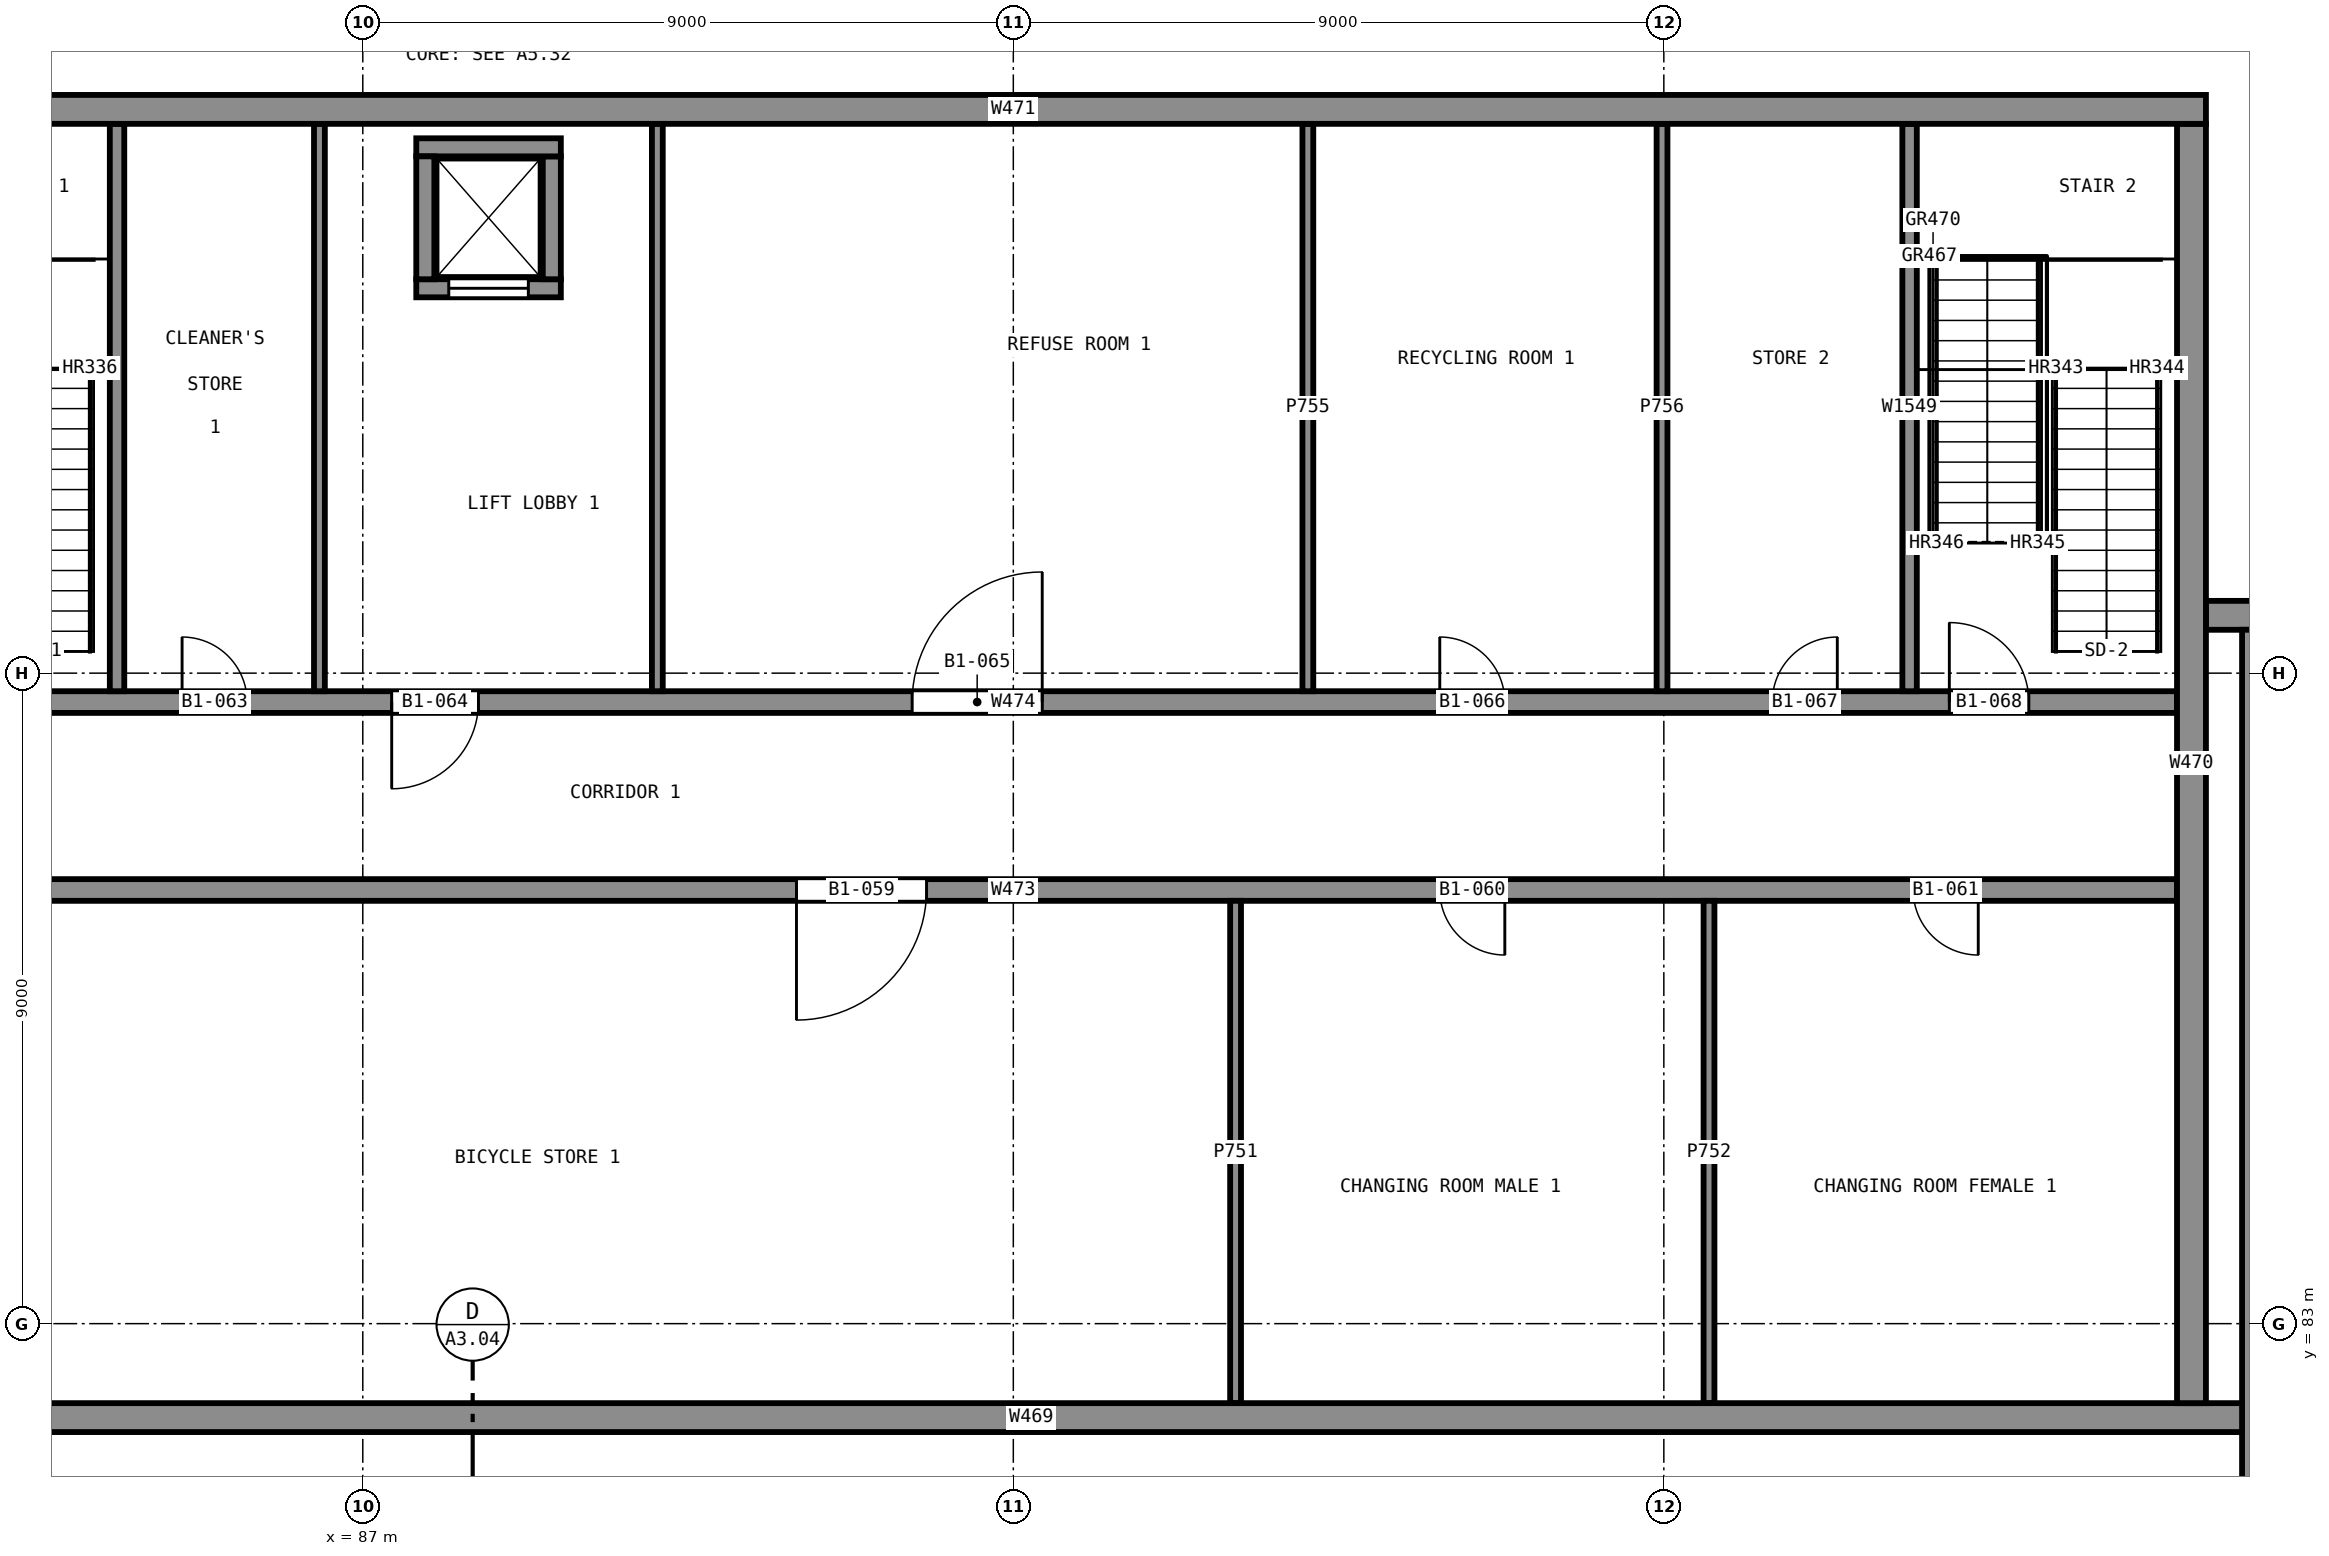
"""IFC4 building model, lengths in metres.
Left out: names, types, materials, properties, quantities, classifications, styles, units other than length and angle.
Written with IfcOpenShell. Run it as: python <this file> out.ifc"""

import sys

from ifc_helpers import new_model, si_unit, direction, frame, frame_2d, origin, place, context, subcontext, project, spatial, rectangle, extrude, element, fill, save


model = new_model("IFC4")
c1 = context("Model", 3, precision=1e-05, world=origin(), true_north=direction((0.0, 1.0)))
c2 = subcontext(c1, "Body", "Model", "MODEL_VIEW")
j1 = project(units=[si_unit("LENGTHUNIT", "METRE"), si_unit("PLANEANGLEUNIT", "RADIAN")], contexts=[c1])
p1 = place(None, origin())
s1 = spatial("IfcSite", under=j1, at=p1, CompositionType="ELEMENT")
p2 = place(p1, origin())
s2 = spatial("IfcBuilding", under=s1, at=p2, CompositionType="ELEMENT")
p3 = place(p2, frame((0.0, 0.0, -5.0)))
s3 = spatial("IfcBuildingStorey", under=s2, at=p3, CompositionType="ELEMENT", Elevation=-5.0)
p4 = place(p3, frame((151.0, 92.8, 0.0), z_axis=(0.0, 0.0, 1.0), x_axis=(-1.0, 0.0, 0.0)))
e1 = element("IfcWall", 1, at=p4, inside=s3, PredefinedType="SOLIDWALL", context=c2, shape_type="SweptSolid", body=[
    extrude(rectangle(XDim=38.5, YDim=0.4, at=frame_2d((19.25, 0.0))), origin(), (0.0, 0.0, 1.0), 4.58),
])
p5 = place(p3, frame((113.2, 92.6, 0.0), z_axis=(0.0, 0.0, 1.0), x_axis=(0.0, -1.0, 0.0)))
e2 = element("IfcWall", 2, at=p5, inside=s3, PredefinedType="SOLIDWALL", context=c2, shape_type="SweptSolid", body=[
    extrude(rectangle(XDim=37.2, YDim=0.4, at=frame_2d((18.6, 0.0))), origin(), (0.0, 0.0, 1.0), 4.58),
])
p6 = place(p3, frame((79.5, 81.7, 0.0), z_axis=(0.0, 0.0, 1.0), x_axis=(1.0, 0.0, 0.0)))
e3 = element("IfcWall", 3, at=p6, inside=s3, PredefinedType="SOLIDWALL", context=c2, shape_type="SweptSolid", body=[
    extrude(rectangle(XDim=33.5, YDim=0.4, at=frame_2d((16.75, 0.0))), origin(), (0.0, 0.0, 1.0), 4.55),
])
p7 = place(p3, frame((112.3, 81.9, 0.0), z_axis=(0.0, 0.0, 1.0), x_axis=(0.0, 1.0, 0.0)))
e4 = element("IfcWall", 4, at=p7, inside=s3, PredefinedType="SOLIDWALL", context=c2, shape_type="SweptSolid", body=[
    extrude(rectangle(XDim=17.7, YDim=0.4, at=frame_2d((8.85, 0.0))), origin(), (0.0, 0.0, 1.0), 4.55),
])
p8 = place(p3, frame((112.5, 99.8, 0.0), z_axis=(0.0, 0.0, 1.0), x_axis=(-1.0, 0.0, 0.0)))
e5 = element("IfcWall", 5, at=p8, inside=s3, PredefinedType="SOLIDWALL", context=c2, shape_type="SweptSolid", body=[
    extrude(rectangle(XDim=33.0, YDim=0.4, at=frame_2d((16.5, 0.0))), origin(), (0.0, 0.0, 1.0), 4.55),
])
p9 = place(p3, frame((79.9, 89.0, 0.0), z_axis=(0.0, 0.0, 1.0), x_axis=(1.0, 0.0, 0.0)))
e6 = element("IfcWall", 6, at=p9, inside=s3, PredefinedType="SHEAR", context=c2, shape_type="SweptSolid", body=[
    extrude(rectangle(XDim=32.2, YDim=0.3, at=frame_2d((16.1, 0.0))), origin(), (0.0, 0.0, 1.0), 4.55),
])
p10 = place(p9, frame((13.1, 0.0, 0.0)))
e7 = element("IfcOpeningElement", 7, at=p10, cuts=e6, PredefinedType="OPENING", context=c2, shape_type="SweptSolid", body=[
    extrude(rectangle(XDim=1.8, YDim=2.1, at=frame_2d((0.9, 1.05))), frame((0.0, 0.16, 0.0), z_axis=(0.0, -1.0, 0.0), x_axis=(1.0, 0.0, 0.0)), (0.0, 0.0, 1.0), 0.32),
])
p11 = place(p9, frame((22.0, 0.0, 0.0)))
e8 = element("IfcOpeningElement", 8, at=p11, cuts=e6, PredefinedType="OPENING", context=c2, shape_type="SweptSolid", body=[
    extrude(rectangle(XDim=0.9, YDim=2.1, at=frame_2d((0.45, 1.05))), frame((0.0, 0.16, 0.0), z_axis=(0.0, -1.0, 0.0), x_axis=(1.0, 0.0, 0.0)), (0.0, 0.0, 1.0), 0.32),
])
p12 = place(p9, frame((28.55, 0.0, 0.0)))
e9 = element("IfcOpeningElement", 9, at=p12, cuts=e6, PredefinedType="OPENING", context=c2, shape_type="SweptSolid", body=[
    extrude(rectangle(XDim=0.9, YDim=2.1, at=frame_2d((0.45, 1.05))), frame((0.0, 0.16, 0.0), z_axis=(0.0, -1.0, 0.0), x_axis=(1.0, 0.0, 0.0)), (0.0, 0.0, 1.0), 0.32),
])
p13 = place(p3, frame((79.9, 91.6, 0.0), z_axis=(0.0, 0.0, 1.0), x_axis=(1.0, 0.0, 0.0)))
e10 = element("IfcWall", 10, at=p13, inside=s3, PredefinedType="SHEAR", context=c2, shape_type="SweptSolid", body=[
    extrude(rectangle(XDim=32.2, YDim=0.3, at=frame_2d((16.1, 0.0))), origin(), (0.0, 0.0, 1.0), 4.55),
])
p14 = place(p13, frame((0.55, 0.0, 0.0)))
e11 = element("IfcOpeningElement", 11, at=p14, cuts=e10, PredefinedType="OPENING", context=c2, shape_type="SweptSolid", body=[
    extrude(rectangle(XDim=1.1, YDim=2.1, at=frame_2d((0.55, 1.05))), frame((0.0, 0.16, 0.0), z_axis=(0.0, -1.0, 0.0), x_axis=(1.0, 0.0, 0.0)), (0.0, 0.0, 1.0), 0.32),
])
p15 = place(p13, frame((4.6, 0.0, 0.0)))
e12 = element("IfcOpeningElement", 12, at=p15, cuts=e10, PredefinedType="OPENING", context=c2, shape_type="SweptSolid", body=[
    extrude(rectangle(XDim=0.9, YDim=2.1, at=frame_2d((0.45, 1.05))), frame((0.0, 0.16, 0.0), z_axis=(0.0, -1.0, 0.0), x_axis=(1.0, 0.0, 0.0)), (0.0, 0.0, 1.0), 0.32),
])
p16 = place(p13, frame((7.5, 0.0, 0.0)))
e13 = element("IfcOpeningElement", 13, at=p16, cuts=e10, PredefinedType="OPENING", context=c2, shape_type="SweptSolid", body=[
    extrude(rectangle(XDim=1.2, YDim=2.1, at=frame_2d((0.6, 1.05))), frame((0.0, 0.16, 0.0), z_axis=(0.0, -1.0, 0.0), x_axis=(1.0, 0.0, 0.0)), (0.0, 0.0, 1.0), 0.32),
])
p17 = place(p13, frame((14.7, 0.0, 0.0)))
e14 = element("IfcOpeningElement", 14, at=p17, cuts=e10, PredefinedType="OPENING", context=c2, shape_type="SweptSolid", body=[
    extrude(rectangle(XDim=1.8, YDim=2.1, at=frame_2d((0.9, 1.05))), frame((0.0, 0.16, 0.0), z_axis=(0.0, -1.0, 0.0), x_axis=(1.0, 0.0, 0.0)), (0.0, 0.0, 1.0), 0.32),
])
p18 = place(p13, frame((22.0, 0.0, 0.0)))
e15 = element("IfcOpeningElement", 15, at=p18, cuts=e10, PredefinedType="OPENING", context=c2, shape_type="SweptSolid", body=[
    extrude(rectangle(XDim=0.9, YDim=2.1, at=frame_2d((0.45, 1.05))), frame((0.0, 0.16, 0.0), z_axis=(0.0, -1.0, 0.0), x_axis=(1.0, 0.0, 0.0)), (0.0, 0.0, 1.0), 0.32),
])
p19 = place(p13, frame((26.6, 0.0, 0.0)))
e16 = element("IfcOpeningElement", 16, at=p19, cuts=e10, PredefinedType="OPENING", context=c2, shape_type="SweptSolid", body=[
    extrude(rectangle(XDim=0.9, YDim=2.1, at=frame_2d((0.45, 1.05))), frame((0.0, 0.16, 0.0), z_axis=(0.0, -1.0, 0.0), x_axis=(1.0, 0.0, 0.0)), (0.0, 0.0, 1.0), 0.32),
])
p20 = place(p13, frame((29.05, 0.0, 0.0)))
e17 = element("IfcOpeningElement", 17, at=p20, cuts=e10, PredefinedType="OPENING", context=c2, shape_type="SweptSolid", body=[
    extrude(rectangle(XDim=1.1, YDim=2.1, at=frame_2d((0.55, 1.05))), frame((0.0, 0.16, 0.0), z_axis=(0.0, -1.0, 0.0), x_axis=(1.0, 0.0, 0.0)), (0.0, 0.0, 1.0), 0.32),
])
p21 = place(p3, frame((87.74, 97.325, 0.0), z_axis=(0.0, 0.0, 1.0), x_axis=(1.0, 0.0, 0.0)))
e18 = element("IfcWall", 18, at=p21, inside=s3, PredefinedType="SHEAR", context=c2, shape_type="SweptSolid", body=[
    extrude(rectangle(XDim=2.0, YDim=0.25, at=frame_2d((1.0, 0.0))), origin(), (0.0, 0.0, 1.0), 5.0),
])
p22 = place(p21, frame((0.45, 0.0, 0.0)))
e19 = element("IfcOpeningElement", 19, at=p22, cuts=e18, PredefinedType="OPENING", context=c2, shape_type="SweptSolid", body=[
    extrude(rectangle(XDim=1.1, YDim=2.1, at=frame_2d((0.55, 1.05))), frame((0.0, 0.135, 0.0), z_axis=(0.0, -1.0, 0.0), x_axis=(1.0, 0.0, 0.0)), (0.0, 0.0, 1.0), 0.27),
])
p23 = place(p3, frame((89.615, 97.45, 0.0), z_axis=(0.0, 0.0, 1.0), x_axis=(0.0, 1.0, 0.0)))
e20 = element("IfcWall", 20, at=p23, inside=s3, PredefinedType="SHEAR", context=c2, shape_type="SweptSolid", body=[
    extrude(rectangle(XDim=1.7, YDim=0.25, at=frame_2d((0.85, 0.0))), origin(), (0.0, 0.0, 1.0), 5.0),
])
p24 = place(p3, frame((89.74, 99.275, 0.0), z_axis=(0.0, 0.0, 1.0), x_axis=(-1.0, 0.0, 0.0)))
e21 = element("IfcWall", 21, at=p24, inside=s3, PredefinedType="SHEAR", context=c2, shape_type="SweptSolid", body=[
    extrude(rectangle(XDim=2.0, YDim=0.25, at=frame_2d((1.0, 0.0))), origin(), (0.0, 0.0, 1.0), 5.0),
])
p25 = place(p3, frame((87.865, 99.15, 0.0), z_axis=(0.0, 0.0, 1.0), x_axis=(0.0, -1.0, 0.0)))
e22 = element("IfcWall", 22, at=p25, inside=s3, PredefinedType="SHEAR", context=c2, shape_type="SweptSolid", body=[
    extrude(rectangle(XDim=1.7, YDim=0.25, at=frame_2d((0.85, 0.0))), origin(), (0.0, 0.0, 1.0), 5.0),
])
for number, where, z_axis, x_axis in (
    (23, (99.075, 81.9, 0.0), (0.0, 0.0, 1.0), (0.0, 1.0, 0.0)),
    (24, (105.625, 81.9, 0.0), (0.0, 0.0, 1.0), (0.0, 1.0, 0.0)),
):
    element("IfcWall", number, at=place(p3, frame(where, z_axis=z_axis, x_axis=x_axis)), inside=s3, PredefinedType="PARTITIONING", context=c2, shape_type="SweptSolid", body=[
        extrude(rectangle(XDim=6.95, YDim=0.15, at=frame_2d((3.475, 0.0))), origin(), (0.0, 0.0, 1.0), 4.55),
    ])
p26 = place(p3, frame((83.6, 91.75, 0.0), z_axis=(0.0, 0.0, 1.0), x_axis=(0.0, 1.0, 0.0)))
e25 = element("IfcWall", 25, at=p26, inside=s3, PredefinedType="SOLIDWALL", context=c2, shape_type="SweptSolid", body=[
    extrude(rectangle(XDim=7.85, YDim=0.2, at=frame_2d((3.925, 0.0))), origin(), (0.0, 0.0, 1.0), 4.55),
])
for number, where, z_axis, x_axis in (
    (26, (86.4, 91.75, 0.0), (0.0, 0.0, 1.0), (0.0, 1.0, 0.0)),
    (27, (91.075, 91.75, 0.0), (0.0, 0.0, 1.0), (0.0, 1.0, 0.0)),
    (28, (100.075, 91.75, 0.0), (0.0, 0.0, 1.0), (0.0, 1.0, 0.0)),
    (29, (104.975, 91.75, 0.0), (0.0, 0.0, 1.0), (0.0, 1.0, 0.0)),
):
    element("IfcWall", number, at=place(p3, frame(where, z_axis=z_axis, x_axis=x_axis)), inside=s3, PredefinedType="PARTITIONING", context=c2, shape_type="SweptSolid", body=[
        extrude(rectangle(XDim=7.85, YDim=0.15, at=frame_2d((3.925, 0.0))), origin(), (0.0, 0.0, 1.0), 4.55),
    ])
p27 = place(p3, frame((108.4, 91.75, 0.0), z_axis=(0.0, 0.0, 1.0), x_axis=(0.0, 1.0, 0.0)))
e30 = element("IfcWall", 30, at=p27, inside=s3, PredefinedType="SOLIDWALL", context=c2, shape_type="SweptSolid", body=[
    extrude(rectangle(XDim=7.85, YDim=0.2, at=frame_2d((3.925, 0.0))), origin(), (0.0, 0.0, 1.0), 4.55),
])
p28 = place(p22, origin())
e31 = element("IfcDoor", 31, at=p28, inside=s3, OperationType="SLIDING_TO_LEFT", PredefinedType="DOOR", context=c2, shape_type="SweptSolid", body=[
    extrude(rectangle(XDim=1.1, YDim=2.1, at=frame_2d((0.55, 1.05))), frame((0.0, 0.025, 0.0), z_axis=(0.0, -1.0, 0.0), x_axis=(1.0, 0.0, 0.0)), (0.0, 0.0, 1.0), 0.05),
])
fill(e19, e31)
p29 = place(p10, frame((1.8, 0.0, 0.0), z_axis=(0.0, 0.0, 1.0), x_axis=(-1.0, 0.0, 0.0)))
e32 = element("IfcDoor", 32, at=p29, inside=s3, OperationType="DOUBLE_DOOR_SINGLE_SWING", PredefinedType="DOOR", context=c2, shape_type="SweptSolid", body=[
    extrude(rectangle(XDim=1.8, YDim=2.1, at=frame_2d((0.9, 1.05))), frame((0.0, 0.025, 0.0), z_axis=(0.0, -1.0, 0.0), x_axis=(1.0, 0.0, 0.0)), (0.0, 0.0, 1.0), 0.05),
])
fill(e7, e32)
p30 = place(p11, frame((0.9, 0.0, 0.0), z_axis=(0.0, 0.0, 1.0), x_axis=(-1.0, 0.0, 0.0)))
e33 = element("IfcDoor", 33, at=p30, inside=s3, OperationType="SINGLE_SWING_RIGHT", PredefinedType="DOOR", context=c2, shape_type="SweptSolid", body=[
    extrude(rectangle(XDim=0.9, YDim=2.1, at=frame_2d((0.45, 1.05))), frame((0.0, 0.025, 0.0), z_axis=(0.0, -1.0, 0.0), x_axis=(1.0, 0.0, 0.0)), (0.0, 0.0, 1.0), 0.05),
])
fill(e8, e33)
p31 = place(p12, frame((0.9, 0.0, 0.0), z_axis=(0.0, 0.0, 1.0), x_axis=(-1.0, 0.0, 0.0)))
e34 = element("IfcDoor", 34, at=p31, inside=s3, OperationType="SINGLE_SWING_RIGHT", PredefinedType="DOOR", context=c2, shape_type="SweptSolid", body=[
    extrude(rectangle(XDim=0.9, YDim=2.1, at=frame_2d((0.45, 1.05))), frame((0.0, 0.025, 0.0), z_axis=(0.0, -1.0, 0.0), x_axis=(1.0, 0.0, 0.0)), (0.0, 0.0, 1.0), 0.05),
])
fill(e9, e34)
p32 = place(p15, origin())
e35 = element("IfcDoor", 35, at=p32, inside=s3, OperationType="SINGLE_SWING_RIGHT", PredefinedType="DOOR", context=c2, shape_type="SweptSolid", body=[
    extrude(rectangle(XDim=0.9, YDim=2.1, at=frame_2d((0.45, 1.05))), frame((0.0, 0.025, 0.0), z_axis=(0.0, -1.0, 0.0), x_axis=(1.0, 0.0, 0.0)), (0.0, 0.0, 1.0), 0.05),
])
fill(e12, e35)
p33 = place(p16, frame((1.2, 0.0, 0.0), z_axis=(0.0, 0.0, 1.0), x_axis=(-1.0, 0.0, 0.0)))
e36 = element("IfcDoor", 36, at=p33, inside=s3, OperationType="DOUBLE_DOOR_SINGLE_SWING", PredefinedType="DOOR", context=c2, shape_type="SweptSolid", body=[
    extrude(rectangle(XDim=1.2, YDim=2.1, at=frame_2d((0.6, 1.05))), frame((0.0, 0.025, 0.0), z_axis=(0.0, -1.0, 0.0), x_axis=(1.0, 0.0, 0.0)), (0.0, 0.0, 1.0), 0.05),
])
fill(e13, e36)
p34 = place(p17, origin())
e37 = element("IfcDoor", 37, at=p34, inside=s3, OperationType="DOUBLE_DOOR_SINGLE_SWING", PredefinedType="DOOR", context=c2, shape_type="SweptSolid", body=[
    extrude(rectangle(XDim=1.8, YDim=2.1, at=frame_2d((0.9, 1.05))), frame((0.0, 0.025, 0.0), z_axis=(0.0, -1.0, 0.0), x_axis=(1.0, 0.0, 0.0)), (0.0, 0.0, 1.0), 0.05),
])
fill(e14, e37)
p35 = place(p18, origin())
e38 = element("IfcDoor", 38, at=p35, inside=s3, OperationType="SINGLE_SWING_RIGHT", PredefinedType="DOOR", context=c2, shape_type="SweptSolid", body=[
    extrude(rectangle(XDim=0.9, YDim=2.1, at=frame_2d((0.45, 1.05))), frame((0.0, 0.025, 0.0), z_axis=(0.0, -1.0, 0.0), x_axis=(1.0, 0.0, 0.0)), (0.0, 0.0, 1.0), 0.05),
])
fill(e15, e38)
p36 = place(p19, origin())
e39 = element("IfcDoor", 39, at=p36, inside=s3, OperationType="SINGLE_SWING_LEFT", PredefinedType="DOOR", context=c2, shape_type="SweptSolid", body=[
    extrude(rectangle(XDim=0.9, YDim=2.1, at=frame_2d((0.45, 1.05))), frame((0.0, 0.025, 0.0), z_axis=(0.0, -1.0, 0.0), x_axis=(1.0, 0.0, 0.0)), (0.0, 0.0, 1.0), 0.05),
])
fill(e16, e39)
p37 = place(p20, origin())
e40 = element("IfcDoor", 40, at=p37, inside=s3, OperationType="SINGLE_SWING_RIGHT", PredefinedType="DOOR", context=c2, shape_type="SweptSolid", body=[
    extrude(rectangle(XDim=1.1, YDim=2.1, at=frame_2d((0.55, 1.05))), frame((0.0, 0.025, 0.0), z_axis=(0.0, -1.0, 0.0), x_axis=(1.0, 0.0, 0.0)), (0.0, 0.0, 1.0), 0.05),
])
fill(e17, e40)
save(model, sys.argv[1])
